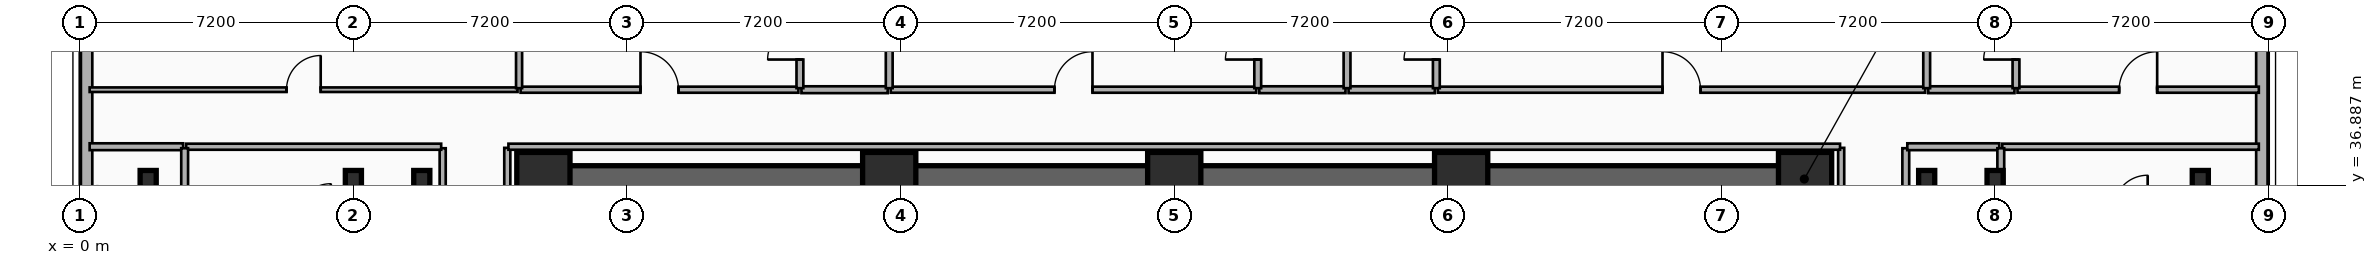
"""IFC4 building model, lengths in metres.
Left out: names, types, materials, properties, quantities, classifications, styles, units other than length and angle.
Written with IfcOpenShell. Run it as: python <this file> out.ifc"""

import sys

from ifc_helpers import new_model, si_unit, direction, frame, frame_2d, origin, origin_2d, place, context, subcontext, project, spatial, rectangle, i_section, extrude, element, fill, save


model = new_model("IFC4")
c1 = context("Model", 3, precision=1e-05, world=origin(), true_north=direction((0.0, 1.0)))
c2 = subcontext(c1, "Body", "Model", "MODEL_VIEW")
j1 = project(units=[si_unit("LENGTHUNIT", "METRE"), si_unit("PLANEANGLEUNIT", "RADIAN")], contexts=[c1])
p1 = place(None, origin())
s1 = spatial("IfcSite", under=j1, at=p1, CompositionType="ELEMENT")
p2 = place(p1, origin())
s2 = spatial("IfcBuilding", under=s1, at=p2, CompositionType="ELEMENT")
p3 = place(p2, frame((0.0, 0.0, 53.5)))
s3 = spatial("IfcBuildingStorey", under=s2, at=p3, CompositionType="ELEMENT", Elevation=53.5)
p4 = place(p3, frame((12.15, 37.05, 0.0), z_axis=(0.0, 0.0, 1.0), x_axis=(1.0, 0.0, 0.0)))
e1 = element("IfcWall", 1, at=p4, inside=s3, PredefinedType="SHEAR", context=c2, shape_type="SweptSolid", body=[
    extrude(rectangle(XDim=33.23, YDim=0.7, at=frame_2d((16.615, 0.0))), origin(), (0.0, 0.0, 1.0), 3.5),
])
for number, where, z_axis, x_axis in (
    (2, (12.2, 37.05, 0.0), (0.0, 0.0, 1.0), (1.0, 0.0, 0.0)),
    (3, (21.3, 37.05, 0.0), (0.0, 0.0, 1.0), (1.0, 0.0, 0.0)),
    (4, (28.8, 37.05, 0.0), (0.0, 0.0, 1.0), (1.0, 0.0, 0.0)),
    (5, (36.35, 37.05, 0.0), (0.0, 0.0, 1.0), (1.0, 0.0, 0.0)),
    (6, (45.4, 37.05, 0.0), (0.0, 0.0, 1.0), (1.0, 0.0, 0.0)),
):
    element("IfcColumn", number, at=place(p3, frame(where, z_axis=z_axis, x_axis=x_axis)), inside=s3, PredefinedType="COLUMN", context=c2, shape_type="SweptSolid", body=[
        extrude(rectangle(XDim=1.4, YDim=1.4, at=origin_2d()), origin(), (0.0, 0.0, 1.0), 3.5),
    ])
for number, where, z_axis, x_axis in (
    (7, (9.0, 37.05, 0.0), (0.0, 0.0, 1.0), (1.0, 0.0, 0.0)),
    (8, (48.6, 37.05, 0.0), (0.0, 0.0, 1.0), (1.0, 0.0, 0.0)),
    (9, (1.8, 37.05, 0.0), (0.0, 0.0, 1.0), (1.0, 0.0, 0.0)),
    (10, (7.2, 37.05, 0.0), (0.0, 0.0, 1.0), (1.0, 0.0, 0.0)),
    (11, (50.4, 37.05, 0.0), (0.0, 0.0, 1.0), (1.0, 0.0, 0.0)),
    (12, (55.8, 37.05, 0.0), (0.0, 0.0, 1.0), (1.0, 0.0, 0.0)),
):
    element("IfcColumn", number, at=place(p3, frame(where, z_axis=z_axis, x_axis=x_axis)), inside=s3, PredefinedType="COLUMN", context=c2, shape_type="SweptSolid", body=[
        extrude(i_section(OverallWidth=0.424, OverallDepth=0.45, WebThickness=0.041, FlangeThickness=0.065, FilletRadius=0.015, at=origin_2d()), origin(), (0.0, 0.0, 1.0), 3.5),
    ])
p5 = place(p3, frame((57.42, 41.0, 0.0), z_axis=(0.0, 0.0, 1.0), x_axis=(0.0, -1.0, 0.0)))
e13 = element("IfcWall", 13, at=p5, inside=s3, PredefinedType="SOLIDWALL", context=c2, shape_type="SweptSolid", body=[
    extrude(rectangle(XDim=15.2, YDim=0.3, at=frame_2d((7.6, 0.0))), origin(), (0.0, 0.0, 1.0), 3.24),
])
p6 = place(p5, frame((10.882, 0.0, 0.48)))
e14 = element("IfcOpeningElement", 14, at=p6, cuts=e13, PredefinedType="OPENING", context=c2, shape_type="SweptSolid", body=[
    extrude(rectangle(XDim=1.4, YDim=1.8, at=frame_2d((0.7, 0.9))), frame((0.0, 0.16, 0.0), z_axis=(0.0, -1.0, 0.0), x_axis=(1.0, 0.0, 0.0)), (0.0, 0.0, 1.0), 0.32),
])
p7 = place(p5, frame((5.621, 0.0, 0.48)))
e15 = element("IfcOpeningElement", 15, at=p7, cuts=e13, PredefinedType="OPENING", context=c2, shape_type="SweptSolid", body=[
    extrude(rectangle(XDim=1.4, YDim=1.8, at=frame_2d((0.7, 0.9))), frame((0.0, 0.16, 0.0), z_axis=(0.0, -1.0, 0.0), x_axis=(1.0, 0.0, 0.0)), (0.0, 0.0, 1.0), 0.32),
])
p8 = place(p3, frame((0.18, 25.8, 0.0), z_axis=(0.0, 0.0, 1.0), x_axis=(0.0, 1.0, 0.0)))
e16 = element("IfcWall", 16, at=p8, inside=s3, PredefinedType="SOLIDWALL", context=c2, shape_type="SweptSolid", body=[
    extrude(rectangle(XDim=15.2, YDim=0.3, at=frame_2d((7.6, 0.0))), origin(), (0.0, 0.0, 1.0), 3.24),
])
p9 = place(p8, frame((2.67, 0.0, 0.48)))
e17 = element("IfcOpeningElement", 17, at=p9, cuts=e16, PredefinedType="OPENING", context=c2, shape_type="SweptSolid", body=[
    extrude(rectangle(XDim=1.4, YDim=1.8, at=frame_2d((0.7, 0.9))), frame((0.0, 0.16, 0.0), z_axis=(0.0, -1.0, 0.0), x_axis=(1.0, 0.0, 0.0)), (0.0, 0.0, 1.0), 0.32),
])
p10 = place(p8, frame((7.709, 0.0, 0.48)))
e18 = element("IfcOpeningElement", 18, at=p10, cuts=e16, PredefinedType="OPENING", context=c2, shape_type="SweptSolid", body=[
    extrude(rectangle(XDim=1.4, YDim=1.8, at=frame_2d((0.7, 0.9))), frame((0.0, 0.16, 0.0), z_axis=(0.0, -1.0, 0.0), x_axis=(1.0, 0.0, 0.0)), (0.0, 0.0, 1.0), 0.32),
])
p11 = place(p3, frame((9.55, 36.067, 0.0), z_axis=(0.0, 0.0, 1.0), x_axis=(0.0, 1.0, 0.0)))
e19 = element("IfcWall", 19, at=p11, inside=s3, PredefinedType="PARTITIONING", context=c2, shape_type="SweptSolid", body=[
    extrude(rectangle(XDim=1.793, YDim=0.16, at=frame_2d((0.896, 0.0))), origin(), (0.0, 0.0, 1.0), 2.72),
])
p12 = place(p3, frame((48.05, 36.29, 0.0), z_axis=(0.0, 0.0, 1.0), x_axis=(0.0, 1.0, 0.0)))
e20 = element("IfcWall", 20, at=p12, inside=s3, PredefinedType="PLUMBINGWALL", context=c2, shape_type="SweptSolid", body=[
    extrude(rectangle(XDim=1.57, YDim=0.18, at=frame_2d((0.785, 0.0))), origin(), (0.0, 0.0, 1.0), 2.72),
])
p13 = place(p3, frame((0.26, 37.9, 0.0), z_axis=(0.0, 0.0, 1.0), x_axis=(1.0, 0.0, 0.0)))
e21 = element("IfcWall", 21, at=p13, inside=s3, PredefinedType="PLUMBINGWALL", context=c2, shape_type="SweptSolid", body=[
    extrude(rectangle(XDim=2.46, YDim=0.18, at=frame_2d((1.23, 0.0))), origin(), (0.0, 0.0, 1.0), 3.24),
])
p14 = place(p3, frame((2.8, 37.9, 0.0), z_axis=(0.0, 0.0, 1.0), x_axis=(1.0, 0.0, 0.0)))
e22 = element("IfcWall", 22, at=p14, inside=s3, PredefinedType="PARTITIONING", context=c2, shape_type="SweptSolid", body=[
    extrude(rectangle(XDim=6.71, YDim=0.16, at=frame_2d((3.355, 0.0))), origin(), (0.0, 0.0, 1.0), 3.24),
])
p15 = place(p3, frame((48.09, 37.9, 0.0), z_axis=(0.0, 0.0, 1.0), x_axis=(1.0, 0.0, 0.0)))
e23 = element("IfcWall", 23, at=p15, inside=s3, PredefinedType="PLUMBINGWALL", context=c2, shape_type="SweptSolid", body=[
    extrude(rectangle(XDim=2.42, YDim=0.18, at=frame_2d((1.21, 0.0))), origin(), (0.0, 0.0, 1.0), 3.24),
])
p16 = place(p3, frame((50.59, 37.9, 0.0), z_axis=(0.0, 0.0, 1.0), x_axis=(1.0, 0.0, 0.0)))
e24 = element("IfcWall", 24, at=p16, inside=s3, PredefinedType="PARTITIONING", context=c2, shape_type="SweptSolid", body=[
    extrude(rectangle(XDim=6.75, YDim=0.16, at=frame_2d((3.375, 0.0))), origin(), (0.0, 0.0, 1.0), 3.24),
])
p17 = place(p3, frame((0.26, 39.4, 0.0), z_axis=(0.0, 0.0, 1.0), x_axis=(1.0, 0.0, 0.0)))
e25 = element("IfcWall", 25, at=p17, inside=s3, PredefinedType="PARTITIONING", context=c2, shape_type="SweptSolid", body=[
    extrude(rectangle(XDim=11.26, YDim=0.12, at=frame_2d((5.63, 0.0))), origin(), (0.0, 0.0, 1.0), 3.24),
])
p18 = place(p17, frame((5.18, 0.0, 0.0)))
e26 = element("IfcOpeningElement", 26, at=p18, cuts=e25, PredefinedType="OPENING", context=c2, shape_type="SweptSolid", body=[
    extrude(rectangle(XDim=0.9, YDim=2.1, at=frame_2d((0.45, 1.05))), frame((0.0, 0.07, 0.0), z_axis=(0.0, -1.0, 0.0), x_axis=(1.0, 0.0, 0.0)), (0.0, 0.0, 1.0), 0.14),
])
p19 = place(p3, frame((11.6, 39.4, 0.0), z_axis=(0.0, 0.0, 1.0), x_axis=(1.0, 0.0, 0.0)))
e27 = element("IfcWall", 27, at=p19, inside=s3, PredefinedType="PARTITIONING", context=c2, shape_type="SweptSolid", body=[
    extrude(rectangle(XDim=7.31, YDim=0.16, at=frame_2d((3.655, 0.0))), origin(), (0.0, 0.0, 1.0), 3.24),
])
p20 = place(p19, frame((3.155, 0.0, 0.0)))
e28 = element("IfcOpeningElement", 28, at=p20, cuts=e27, PredefinedType="OPENING", context=c2, shape_type="SweptSolid", body=[
    extrude(rectangle(XDim=1.0, YDim=2.15, at=frame_2d((0.5, 1.075))), frame((0.0, 0.09, 0.0), z_axis=(0.0, -1.0, 0.0), x_axis=(1.0, 0.0, 0.0)), (0.0, 0.0, 1.0), 0.18),
])
p21 = place(p3, frame((18.99, 39.4, 0.0), z_axis=(0.0, 0.0, 1.0), x_axis=(1.0, 0.0, 0.0)))
e29 = element("IfcWall", 29, at=p21, inside=s3, PredefinedType="PLUMBINGWALL", context=c2, shape_type="SweptSolid", body=[
    extrude(rectangle(XDim=2.27, YDim=0.18, at=frame_2d((1.135, 0.0))), origin(), (0.0, 0.0, 1.0), 3.24),
])
p22 = place(p3, frame((21.34, 39.4, 0.0), z_axis=(0.0, 0.0, 1.0), x_axis=(1.0, 0.0, 0.0)))
e30 = element("IfcWall", 30, at=p22, inside=s3, PredefinedType="PARTITIONING", context=c2, shape_type="SweptSolid", body=[
    extrude(rectangle(XDim=9.617, YDim=0.16, at=frame_2d((4.809, 0.0))), origin(), (0.0, 0.0, 1.0), 3.24),
])
p23 = place(p22, frame((4.309, 0.0, 0.0)))
e31 = element("IfcOpeningElement", 31, at=p23, cuts=e30, PredefinedType="OPENING", context=c2, shape_type="SweptSolid", body=[
    extrude(rectangle(XDim=1.0, YDim=2.15, at=frame_2d((0.5, 1.075))), frame((0.0, 0.09, 0.0), z_axis=(0.0, -1.0, 0.0), x_axis=(1.0, 0.0, 0.0)), (0.0, 0.0, 1.0), 0.18),
])
p24 = place(p3, frame((31.037, 39.4, 0.0), z_axis=(0.0, 0.0, 1.0), x_axis=(1.0, 0.0, 0.0)))
e32 = element("IfcWall", 32, at=p24, inside=s3, PredefinedType="PLUMBINGWALL", context=c2, shape_type="SweptSolid", body=[
    extrude(rectangle(XDim=2.27, YDim=0.18, at=frame_2d((1.135, 0.0))), origin(), (0.0, 0.0, 1.0), 3.24),
])
p25 = place(p3, frame((35.737, 39.4, 0.0), z_axis=(0.0, 0.0, 1.0), x_axis=(1.0, 0.0, 0.0)))
e33 = element("IfcWall", 33, at=p25, inside=s3, PredefinedType="PARTITIONING", context=c2, shape_type="SweptSolid", body=[
    extrude(rectangle(XDim=12.823, YDim=0.16, at=frame_2d((6.412, 0.0))), origin(), (0.0, 0.0, 1.0), 3.24),
])
p26 = place(p25, frame((5.912, 0.0, 0.0)))
e34 = element("IfcOpeningElement", 34, at=p26, cuts=e33, PredefinedType="OPENING", context=c2, shape_type="SweptSolid", body=[
    extrude(rectangle(XDim=1.0, YDim=2.15, at=frame_2d((0.5, 1.075))), frame((0.0, 0.09, 0.0), z_axis=(0.0, -1.0, 0.0), x_axis=(1.0, 0.0, 0.0)), (0.0, 0.0, 1.0), 0.18),
])
p27 = place(p3, frame((33.387, 39.4, 0.0), z_axis=(0.0, 0.0, 1.0), x_axis=(1.0, 0.0, 0.0)))
e35 = element("IfcWall", 35, at=p27, inside=s3, PredefinedType="PLUMBINGWALL", context=c2, shape_type="SweptSolid", body=[
    extrude(rectangle(XDim=2.27, YDim=0.18, at=frame_2d((1.135, 0.0))), origin(), (0.0, 0.0, 1.0), 3.24),
])
p28 = place(p3, frame((50.99, 39.4, 0.0), z_axis=(0.0, 0.0, 1.0), x_axis=(1.0, 0.0, 0.0)))
e36 = element("IfcWall", 36, at=p28, inside=s3, PredefinedType="PARTITIONING", context=c2, shape_type="SweptSolid", body=[
    extrude(rectangle(XDim=6.35, YDim=0.16, at=frame_2d((3.175, 0.0))), origin(), (0.0, 0.0, 1.0), 3.24),
])
p29 = place(p28, frame((2.675, 0.0, 0.0)))
e37 = element("IfcOpeningElement", 37, at=p29, cuts=e36, PredefinedType="OPENING", context=c2, shape_type="SweptSolid", body=[
    extrude(rectangle(XDim=1.0, YDim=2.15, at=frame_2d((0.5, 1.075))), frame((0.0, 0.09, 0.0), z_axis=(0.0, -1.0, 0.0), x_axis=(1.0, 0.0, 0.0)), (0.0, 0.0, 1.0), 0.18),
])
p30 = place(p3, frame((48.64, 39.4, 0.0), z_axis=(0.0, 0.0, 1.0), x_axis=(1.0, 0.0, 0.0)))
e38 = element("IfcWall", 38, at=p30, inside=s3, PredefinedType="PLUMBINGWALL", context=c2, shape_type="SweptSolid", body=[
    extrude(rectangle(XDim=2.27, YDim=0.18, at=frame_2d((1.135, 0.0))), origin(), (0.0, 0.0, 1.0), 3.24),
])
p31 = place(p3, frame((2.76, 36.067, 0.0), z_axis=(0.0, 0.0, 1.0), x_axis=(0.0, 1.0, 0.0)))
e39 = element("IfcWall", 39, at=p31, inside=s3, PredefinedType="PLUMBINGWALL", context=c2, shape_type="SweptSolid", body=[
    extrude(rectangle(XDim=1.793, YDim=0.18, at=frame_2d((0.896, 0.0))), origin(), (0.0, 0.0, 1.0), 2.72),
])
p32 = place(p3, frame((50.55, 36.29, 0.0), z_axis=(0.0, 0.0, 1.0), x_axis=(0.0, 1.0, 0.0)))
e40 = element("IfcWall", 40, at=p32, inside=s3, PredefinedType="PLUMBINGWALL", context=c2, shape_type="SweptSolid", body=[
    extrude(rectangle(XDim=1.57, YDim=0.18, at=frame_2d((0.785, 0.0))), origin(), (0.0, 0.0, 1.0), 2.57),
])
p33 = place(p3, frame((11.56, 39.44, 0.0), z_axis=(0.0, 0.0, 1.0), x_axis=(0.0, 1.0, 0.0)))
e41 = element("IfcWall", 41, at=p33, inside=s3, PredefinedType="PARTITIONING", context=c2, shape_type="SweptSolid", body=[
    extrude(rectangle(XDim=5.5, YDim=0.16, at=frame_2d((2.75, 0.0))), origin(), (0.0, 0.0, 1.0), 3.24),
])
p34 = place(p3, frame((18.95, 39.44, 0.0), z_axis=(0.0, 0.0, 1.0), x_axis=(0.0, 1.0, 0.0)))
e42 = element("IfcWall", 42, at=p34, inside=s3, PredefinedType="PLUMBINGWALL", context=c2, shape_type="SweptSolid", body=[
    extrude(rectangle(XDim=2.358, YDim=0.18, at=frame_2d((1.179, 0.0))), origin(), (0.0, 0.0, 1.0), 3.24),
])
p35 = place(p34, frame((0.754, 0.0, 0.0)))
e43 = element("IfcOpeningElement", 43, at=p35, cuts=e42, PredefinedType="OPENING", context=c2, shape_type="SweptSolid", body=[
    extrude(rectangle(XDim=0.85, YDim=2.1, at=frame_2d((0.425, 1.05))), frame((0.0, 0.1, 0.0), z_axis=(0.0, -1.0, 0.0), x_axis=(1.0, 0.0, 0.0)), (0.0, 0.0, 1.0), 0.2),
])
p36 = place(p3, frame((21.3, 39.44, 0.0), z_axis=(0.0, 0.0, 1.0), x_axis=(0.0, 1.0, 0.0)))
e44 = element("IfcWall", 44, at=p36, inside=s3, PredefinedType="PLUMBINGWALL", context=c2, shape_type="SweptSolid", body=[
    extrude(rectangle(XDim=2.358, YDim=0.18, at=frame_2d((1.179, 0.0))), origin(), (0.0, 0.0, 1.0), 3.24),
])
p37 = place(p3, frame((30.997, 39.44, 0.0), z_axis=(0.0, 0.0, 1.0), x_axis=(0.0, 1.0, 0.0)))
e45 = element("IfcWall", 45, at=p37, inside=s3, PredefinedType="PLUMBINGWALL", context=c2, shape_type="SweptSolid", body=[
    extrude(rectangle(XDim=2.358, YDim=0.18, at=frame_2d((1.179, 0.0))), origin(), (0.0, 0.0, 1.0), 3.24),
])
p38 = place(p37, frame((0.754, 0.0, 0.0)))
e46 = element("IfcOpeningElement", 46, at=p38, cuts=e45, PredefinedType="OPENING", context=c2, shape_type="SweptSolid", body=[
    extrude(rectangle(XDim=0.85, YDim=2.1, at=frame_2d((0.425, 1.05))), frame((0.0, 0.1, 0.0), z_axis=(0.0, -1.0, 0.0), x_axis=(1.0, 0.0, 0.0)), (0.0, 0.0, 1.0), 0.2),
])
p39 = place(p3, frame((33.347, 39.44, 0.0), z_axis=(0.0, 0.0, 1.0), x_axis=(0.0, 1.0, 0.0)))
e47 = element("IfcWall", 47, at=p39, inside=s3, PredefinedType="PLUMBINGWALL", context=c2, shape_type="SweptSolid", body=[
    extrude(rectangle(XDim=2.358, YDim=0.18, at=frame_2d((1.179, 0.0))), origin(), (0.0, 0.0, 1.0), 3.24),
])
p40 = place(p3, frame((35.697, 39.44, 0.0), z_axis=(0.0, 0.0, 1.0), x_axis=(0.0, 1.0, 0.0)))
e48 = element("IfcWall", 48, at=p40, inside=s3, PredefinedType="PLUMBINGWALL", context=c2, shape_type="SweptSolid", body=[
    extrude(rectangle(XDim=2.358, YDim=0.18, at=frame_2d((1.179, 0.0))), origin(), (0.0, 0.0, 1.0), 3.24),
])
p41 = place(p40, frame((0.754, 0.0, 0.0)))
e49 = element("IfcOpeningElement", 49, at=p41, cuts=e48, PredefinedType="OPENING", context=c2, shape_type="SweptSolid", body=[
    extrude(rectangle(XDim=0.85, YDim=2.1, at=frame_2d((0.425, 1.05))), frame((0.0, 0.1, 0.0), z_axis=(0.0, -1.0, 0.0), x_axis=(1.0, 0.0, 0.0)), (0.0, 0.0, 1.0), 0.2),
])
p42 = place(p3, frame((48.6, 39.44, 0.0), z_axis=(0.0, 0.0, 1.0), x_axis=(0.0, 1.0, 0.0)))
e50 = element("IfcWall", 50, at=p42, inside=s3, PredefinedType="PLUMBINGWALL", context=c2, shape_type="SweptSolid", body=[
    extrude(rectangle(XDim=2.358, YDim=0.18, at=frame_2d((1.179, 0.0))), origin(), (0.0, 0.0, 1.0), 3.24),
])
p43 = place(p3, frame((50.95, 39.44, 0.0), z_axis=(0.0, 0.0, 1.0), x_axis=(0.0, 1.0, 0.0)))
e51 = element("IfcWall", 51, at=p43, inside=s3, PredefinedType="PLUMBINGWALL", context=c2, shape_type="SweptSolid", body=[
    extrude(rectangle(XDim=2.358, YDim=0.18, at=frame_2d((1.179, 0.0))), origin(), (0.0, 0.0, 1.0), 3.24),
])
p44 = place(p43, frame((0.754, 0.0, 0.0)))
e52 = element("IfcOpeningElement", 52, at=p44, cuts=e51, PredefinedType="OPENING", context=c2, shape_type="SweptSolid", body=[
    extrude(rectangle(XDim=0.85, YDim=2.1, at=frame_2d((0.425, 1.05))), frame((0.0, 0.1, 0.0), z_axis=(0.0, -1.0, 0.0), x_axis=(1.0, 0.0, 0.0)), (0.0, 0.0, 1.0), 0.2),
])
for number, where, z_axis, x_axis in (
    (53, (11.25, 27.63, 0.0), (0.0, 0.0, 1.0), (0.0, 1.0, 0.0)),
    (54, (46.35, 27.63, 0.0), (0.0, 0.0, 1.0), (0.0, 1.0, 0.0)),
):
    element("IfcWall", number, at=place(p3, frame(where, z_axis=z_axis, x_axis=x_axis)), inside=s3, PredefinedType="PARTITIONING", context=c2, shape_type="SweptSolid", body=[
        extrude(rectangle(XDim=10.24, YDim=0.16, at=frame_2d((5.12, 0.0))), origin(), (0.0, 0.0, 1.0), 2.72),
    ])
p45 = place(p3, frame((11.28, 37.9, 0.0), z_axis=(0.0, 0.0, 1.0), x_axis=(1.0, 0.0, 0.0)))
e55 = element("IfcWall", 55, at=p45, inside=s3, PredefinedType="PARTITIONING", context=c2, shape_type="SweptSolid", body=[
    extrude(rectangle(XDim=35.04, YDim=0.16, at=frame_2d((17.52, 0.0))), origin(), (0.0, 0.0, 1.0), 3.24),
])
p46 = place(p18, origin())
e56 = element("IfcDoor", 56, at=p46, inside=s3, OperationType="SINGLE_SWING_RIGHT", PredefinedType="DOOR", context=c2, shape_type="SweptSolid", body=[
    extrude(rectangle(XDim=0.9, YDim=2.1, at=frame_2d((0.45, 1.05))), frame((0.0, 0.025, 0.0), z_axis=(0.0, -1.0, 0.0), x_axis=(1.0, 0.0, 0.0)), (0.0, 0.0, 1.0), 0.05),
])
fill(e26, e56)
p47 = place(p20, origin())
e57 = element("IfcDoor", 57, at=p47, inside=s3, OperationType="SINGLE_SWING_LEFT", PredefinedType="DOOR", context=c2, shape_type="SweptSolid", body=[
    extrude(rectangle(XDim=1.0, YDim=2.15, at=frame_2d((0.5, 1.075))), frame((0.0, 0.025, 0.0), z_axis=(0.0, -1.0, 0.0), x_axis=(1.0, 0.0, 0.0)), (0.0, 0.0, 1.0), 0.05),
])
fill(e28, e57)
p48 = place(p23, origin())
e58 = element("IfcDoor", 58, at=p48, inside=s3, OperationType="SINGLE_SWING_RIGHT", PredefinedType="DOOR", context=c2, shape_type="SweptSolid", body=[
    extrude(rectangle(XDim=1.0, YDim=2.15, at=frame_2d((0.5, 1.075))), frame((0.0, 0.025, 0.0), z_axis=(0.0, -1.0, 0.0), x_axis=(1.0, 0.0, 0.0)), (0.0, 0.0, 1.0), 0.05),
])
fill(e31, e58)
p49 = place(p26, origin())
e59 = element("IfcDoor", 59, at=p49, inside=s3, OperationType="SINGLE_SWING_LEFT", PredefinedType="DOOR", context=c2, shape_type="SweptSolid", body=[
    extrude(rectangle(XDim=1.0, YDim=2.15, at=frame_2d((0.5, 1.075))), frame((0.0, 0.025, 0.0), z_axis=(0.0, -1.0, 0.0), x_axis=(1.0, 0.0, 0.0)), (0.0, 0.0, 1.0), 0.05),
])
fill(e34, e59)
p50 = place(p29, origin())
e60 = element("IfcDoor", 60, at=p50, inside=s3, OperationType="SINGLE_SWING_RIGHT", PredefinedType="DOOR", context=c2, shape_type="SweptSolid", body=[
    extrude(rectangle(XDim=1.0, YDim=2.15, at=frame_2d((0.5, 1.075))), frame((0.0, 0.025, 0.0), z_axis=(0.0, -1.0, 0.0), x_axis=(1.0, 0.0, 0.0)), (0.0, 0.0, 1.0), 0.05),
])
fill(e37, e60)
p51 = place(p35, origin())
e61 = element("IfcDoor", 61, at=p51, inside=s3, OperationType="SINGLE_SWING_LEFT", PredefinedType="DOOR", context=c2, shape_type="SweptSolid", body=[
    extrude(rectangle(XDim=0.85, YDim=2.1, at=frame_2d((0.425, 1.05))), frame((0.0, 0.025, 0.0), z_axis=(0.0, -1.0, 0.0), x_axis=(1.0, 0.0, 0.0)), (0.0, 0.0, 1.0), 0.05),
])
fill(e43, e61)
p52 = place(p38, origin())
e62 = element("IfcDoor", 62, at=p52, inside=s3, OperationType="SINGLE_SWING_LEFT", PredefinedType="DOOR", context=c2, shape_type="SweptSolid", body=[
    extrude(rectangle(XDim=0.85, YDim=2.1, at=frame_2d((0.425, 1.05))), frame((0.0, 0.025, 0.0), z_axis=(0.0, -1.0, 0.0), x_axis=(1.0, 0.0, 0.0)), (0.0, 0.0, 1.0), 0.05),
])
fill(e46, e62)
p53 = place(p41, origin())
e63 = element("IfcDoor", 63, at=p53, inside=s3, OperationType="SINGLE_SWING_LEFT", PredefinedType="DOOR", context=c2, shape_type="SweptSolid", body=[
    extrude(rectangle(XDim=0.85, YDim=2.1, at=frame_2d((0.425, 1.05))), frame((0.0, 0.025, 0.0), z_axis=(0.0, -1.0, 0.0), x_axis=(1.0, 0.0, 0.0)), (0.0, 0.0, 1.0), 0.05),
])
fill(e49, e63)
p54 = place(p44, origin())
e64 = element("IfcDoor", 64, at=p54, inside=s3, OperationType="SINGLE_SWING_LEFT", PredefinedType="DOOR", context=c2, shape_type="SweptSolid", body=[
    extrude(rectangle(XDim=0.85, YDim=2.1, at=frame_2d((0.425, 1.05))), frame((0.0, 0.025, 0.0), z_axis=(0.0, -1.0, 0.0), x_axis=(1.0, 0.0, 0.0)), (0.0, 0.0, 1.0), 0.05),
])
fill(e52, e64)
save(model, sys.argv[1])
